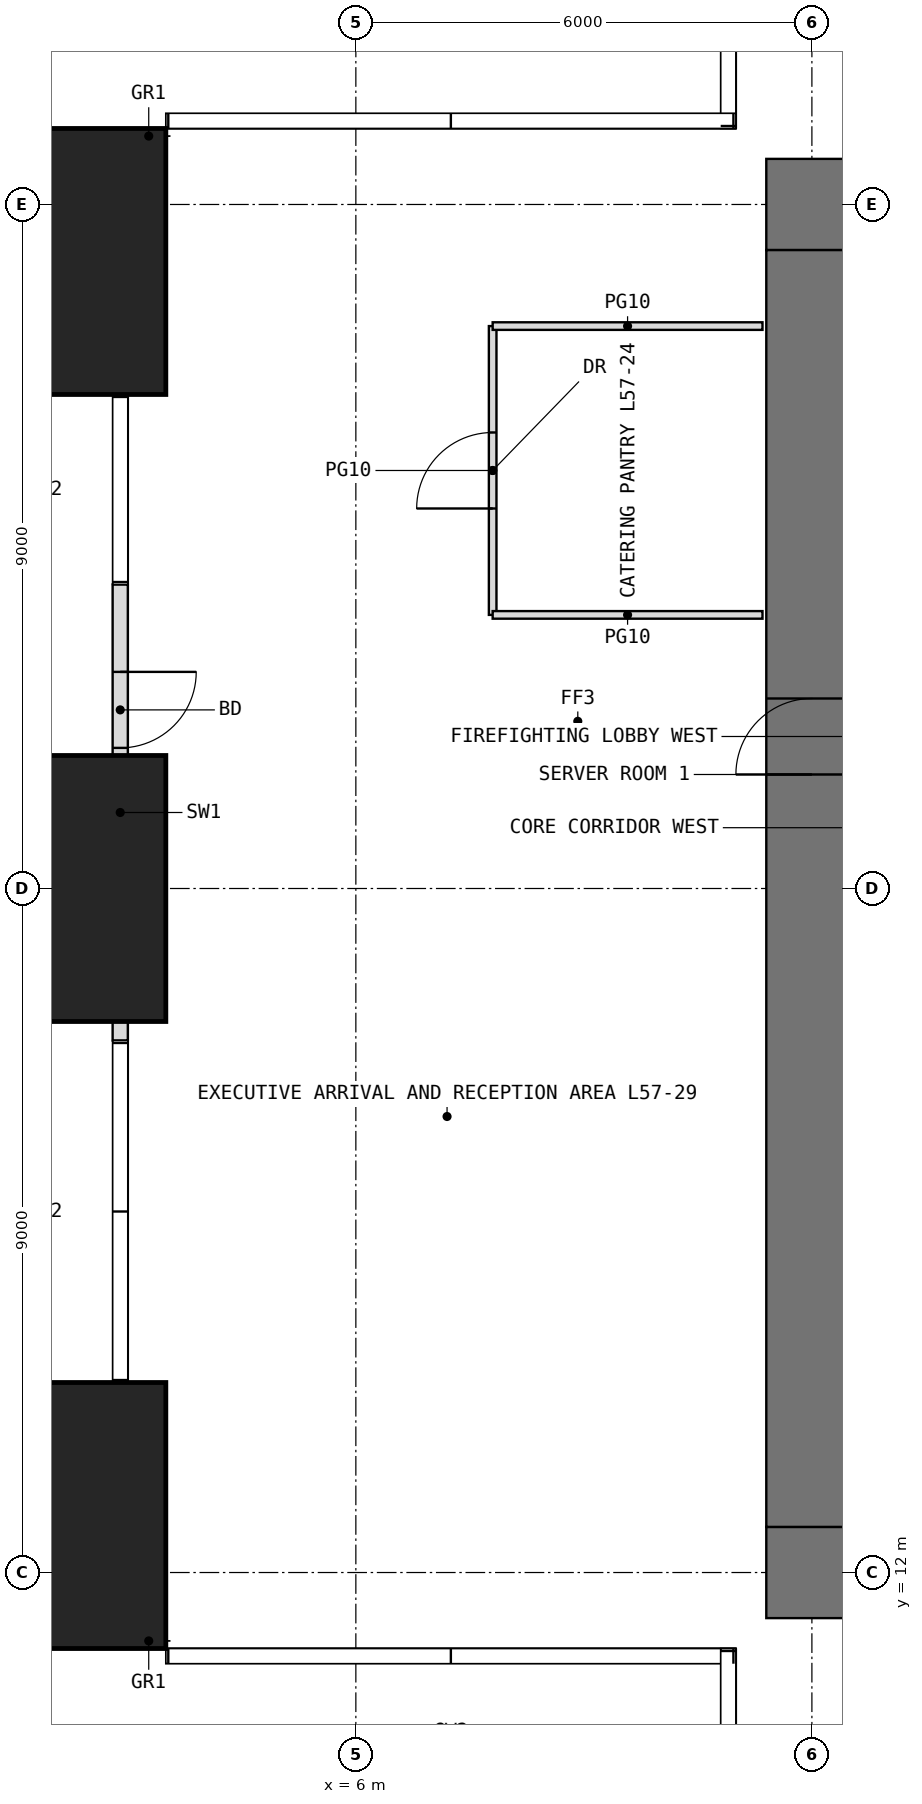
"""IFC4 building model, lengths in metres.
Left out: names, types, materials, properties, quantities, classifications, styles, units other than length and angle.
Written with IfcOpenShell. Run it as: python <this file> out.ifc"""

import sys

from ifc_helpers import new_model, si_unit, direction, frame, frame_2d, origin, origin_2d, place, context, subcontext, project, spatial, rectangle, extrude, element, fill, save


model = new_model("IFC4")
c1 = context("Model", 3, precision=1e-05, world=origin(), true_north=direction((0.0, 1.0)))
c2 = subcontext(c1, "Body", "Model", "MODEL_VIEW")
j1 = project(units=[si_unit("LENGTHUNIT", "METRE"), si_unit("PLANEANGLEUNIT", "RADIAN")], contexts=[c1])
p1 = place(None, origin())
s1 = spatial("IfcSite", under=j1, at=p1, CompositionType="ELEMENT")
p2 = place(p1, origin())
s2 = spatial("IfcBuilding", under=s1, at=p2, CompositionType="ELEMENT")
p3 = place(p2, frame((0.0, 0.0, 239.5)))
s3 = spatial("IfcBuildingStorey", under=s2, at=p3, CompositionType="ELEMENT", Elevation=239.5)
for number, where, z_axis, x_axis in (
    (1, (1.75, 12.75, 0.0), (0.0, 0.0, 1.0), (1.0, 0.0, 0.0)),
    (2, (1.75, 21.0, 0.0), (0.0, 0.0, 1.0), (1.0, 0.0, 0.0)),
    (3, (1.75, 29.25, 0.0), (0.0, 0.0, 1.0), (1.0, 0.0, 0.0)),
):
    element("IfcColumn", number, at=place(p3, frame(where, z_axis=z_axis, x_axis=x_axis)), inside=s3, PredefinedType="COLUMN", context=c2, shape_type="SweptSolid", body=[
        extrude(rectangle(XDim=3.5, YDim=3.5, at=origin_2d()), origin(), (0.0, 0.0, 1.0), 4.5),
    ])
p4 = place(p3, frame((2.9, 25.0, 0.0), z_axis=(0.0, 0.0, 1.0), x_axis=(0.0, -1.0, 0.0)))
e4 = element("IfcWall", 4, at=p4, inside=s3, PredefinedType="USERDEFINED", context=c2, shape_type="SweptSolid", body=[
    extrude(rectangle(XDim=6.0, YDim=0.2, at=frame_2d((3.0, 0.0))), origin(), (0.0, 0.0, 1.0), 4.25),
])
p5 = place(p4, frame((1.15, 0.0, 0.0)))
e5 = element("IfcOpeningElement", 5, at=p5, cuts=e4, PredefinedType="OPENING", context=c2, shape_type="SweptSolid", body=[
    extrude(rectangle(XDim=1.0, YDim=2.4, at=frame_2d((0.5, 1.2))), frame((0.0, 0.11, 0.0), z_axis=(0.0, -1.0, 0.0), x_axis=(1.0, 0.0, 0.0)), (0.0, 0.0, 1.0), 0.22),
])
p6 = place(p3, frame((11.4, 12.0, -0.05), z_axis=(0.0, 0.0, 1.0), x_axis=(1.0, 0.0, 0.0)))
e6 = element("IfcWall", 6, at=p6, inside=s3, PredefinedType="SHEAR", context=c2, shape_type="SweptSolid", body=[
    extrude(rectangle(XDim=19.2, YDim=1.2, at=frame_2d((9.6, 0.0))), origin(), (0.0, 0.0, 1.0), 4.5),
])
p7 = place(p6, frame((8.6, 0.0, 0.05)))
e7 = element("IfcOpeningElement", 7, at=p7, cuts=e6, PredefinedType="OPENING", context=c2, shape_type="SweptSolid", body=[
    extrude(rectangle(XDim=2.0, YDim=2.2, at=frame_2d((1.0, 1.1))), frame((0.0, 0.61, 0.0), z_axis=(0.0, -1.0, 0.0), x_axis=(1.0, 0.0, 0.0)), (0.0, 0.0, 1.0), 1.22),
])
p8 = place(p3, frame((11.4, 30.0, -0.05), z_axis=(0.0, 0.0, 1.0), x_axis=(1.0, 0.0, 0.0)))
e8 = element("IfcWall", 8, at=p8, inside=s3, PredefinedType="SHEAR", context=c2, shape_type="SweptSolid", body=[
    extrude(rectangle(XDim=19.2, YDim=1.2, at=frame_2d((9.6, 0.0))), origin(), (0.0, 0.0, 1.0), 4.5),
])
p9 = place(p8, frame((8.6, 0.0, 0.05)))
e9 = element("IfcOpeningElement", 9, at=p9, cuts=e8, PredefinedType="OPENING", context=c2, shape_type="SweptSolid", body=[
    extrude(rectangle(XDim=2.0, YDim=2.2, at=frame_2d((1.0, 1.1))), frame((0.0, 0.61, 0.0), z_axis=(0.0, -1.0, 0.0), x_axis=(1.0, 0.0, 0.0)), (0.0, 0.0, 1.0), 1.22),
])
p10 = place(p3, frame((12.0, 12.6, -0.05), z_axis=(0.0, 0.0, 1.0), x_axis=(0.0, 1.0, 0.0)))
e10 = element("IfcWall", 10, at=p10, inside=s3, PredefinedType="SHEAR", context=c2, shape_type="SweptSolid", body=[
    extrude(rectangle(XDim=16.8, YDim=1.2, at=frame_2d((8.4, 0.0))), origin(), (0.0, 0.0, 1.0), 4.5),
])
p11 = place(p10, frame((9.9, 0.0, 0.05)))
e11 = element("IfcOpeningElement", 11, at=p11, cuts=e10, PredefinedType="OPENING", context=c2, shape_type="SweptSolid", body=[
    extrude(rectangle(XDim=1.0, YDim=2.2, at=frame_2d((0.5, 1.1))), frame((0.0, 0.61, 0.0), z_axis=(0.0, -1.0, 0.0), x_axis=(1.0, 0.0, 0.0)), (0.0, 0.0, 1.0), 1.22),
])
p12 = place(p3, frame((7.8, 24.6, 0.0), z_axis=(0.0, 0.0, 1.0), x_axis=(0.0, 1.0, 0.0)))
e12 = element("IfcWall", 12, at=p12, inside=s3, PredefinedType="PARTITIONING", context=c2, shape_type="SweptSolid", body=[
    extrude(rectangle(XDim=3.8, YDim=0.1, at=frame_2d((1.9, 0.0))), origin(), (0.0, 0.0, 1.0), 4.25),
])
p13 = place(p12, frame((1.4, 0.0, 0.0)))
e13 = element("IfcOpeningElement", 13, at=p13, cuts=e12, PredefinedType="OPENING", context=c2, shape_type="SweptSolid", body=[
    extrude(rectangle(XDim=1.0, YDim=2.2, at=frame_2d((0.5, 1.1))), frame((0.0, 0.06, 0.0), z_axis=(0.0, -1.0, 0.0), x_axis=(1.0, 0.0, 0.0)), (0.0, 0.0, 1.0), 0.12),
])
for number, where, z_axis, x_axis in (
    (14, (7.8, 24.6, 0.0), (0.0, 0.0, 1.0), (1.0, 0.0, 0.0)),
    (15, (7.8, 28.4, 0.0), (0.0, 0.0, 1.0), (1.0, 0.0, 0.0)),
):
    element("IfcWall", number, at=place(p3, frame(where, z_axis=z_axis, x_axis=x_axis)), inside=s3, PredefinedType="PARTITIONING", context=c2, shape_type="SweptSolid", body=[
        extrude(rectangle(XDim=3.55, YDim=0.1, at=frame_2d((1.775, 0.0))), origin(), (0.0, 0.0, 1.0), 4.25),
    ])
p14 = place(p5, origin())
e16 = element("IfcDoor", 16, at=p14, inside=s3, OperationType="SINGLE_SWING_LEFT", PredefinedType="DOOR", context=c2, shape_type="SweptSolid", body=[
    extrude(rectangle(XDim=1.0, YDim=2.4, at=frame_2d((0.5, 1.2))), frame((0.0, 0.025, 0.0), z_axis=(0.0, -1.0, 0.0), x_axis=(1.0, 0.0, 0.0)), (0.0, 0.0, 1.0), 0.05),
])
fill(e5, e16)
p15 = place(p11, origin())
e17 = element("IfcDoor", 17, at=p15, inside=s3, OperationType="SINGLE_SWING_LEFT", PredefinedType="DOOR", context=c2, shape_type="SweptSolid", body=[
    extrude(rectangle(XDim=1.0, YDim=2.2, at=frame_2d((0.5, 1.1))), frame((0.0, 0.025, 0.0), z_axis=(0.0, -1.0, 0.0), x_axis=(1.0, 0.0, 0.0)), (0.0, 0.0, 1.0), 0.05),
])
fill(e11, e17)
p16 = place(p13, origin())
e18 = element("IfcDoor", 18, at=p16, inside=s3, OperationType="SINGLE_SWING_LEFT", PredefinedType="DOOR", context=c2, shape_type="SweptSolid", body=[
    extrude(rectangle(XDim=1.0, YDim=2.2, at=frame_2d((0.5, 1.1))), frame((0.0, 0.025, 0.0), z_axis=(0.0, -1.0, 0.0), x_axis=(1.0, 0.0, 0.0)), (0.0, 0.0, 1.0), 0.05),
])
fill(e13, e18)
save(model, sys.argv[1])
